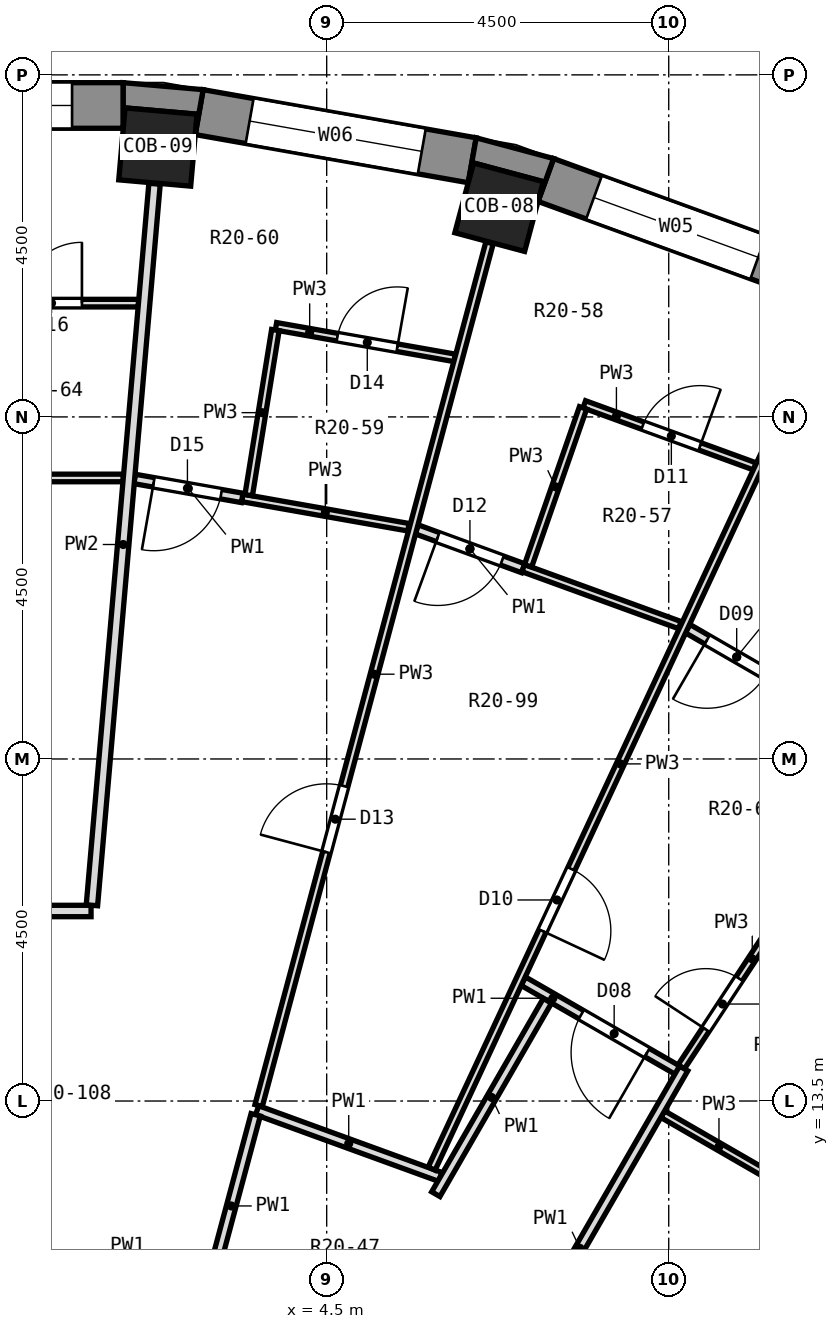
"""IFC4 building model, lengths in metres.
Left out: names, types, materials, properties, quantities, classifications, styles, units other than length and angle.
Written with IfcOpenShell. Run it as: python <this file> out.ifc"""

import sys

from ifc_helpers import new_model, si_unit, direction, frame, frame_2d, origin, origin_2d, place, context, subcontext, project, spatial, polyline, rectangle, outline, extrude, element, fill, save


model = new_model("IFC4")
c1 = context("Model", 3, precision=1e-05, world=origin(), true_north=direction((0.0, 1.0)))
c2 = subcontext(c1, "Body", "Model", "MODEL_VIEW")
j1 = project(units=[si_unit("LENGTHUNIT", "METRE"), si_unit("PLANEANGLEUNIT", "RADIAN")], contexts=[c1])
p1 = place(None, origin())
s1 = spatial("IfcSite", under=j1, at=p1, CompositionType="ELEMENT")
p2 = place(p1, origin())
s2 = spatial("IfcBuilding", under=s1, at=p2, CompositionType="ELEMENT")
p3 = place(p2, frame((0.0, 0.0, 121.6)))
s3 = spatial("IfcBuildingStorey", under=s2, at=p3, CompositionType="ELEMENT", Elevation=121.6)
for number, where, z_axis, x_axis in (
    (1, (6.768, 25.259, 0.0), (0.0, 0.0, 1.0), (0.259, 0.966, 0.0)),
    (2, (2.279, 26.051, 0.0), (0.0, 0.0, 1.0), (0.087, 0.996, 0.0)),
):
    element("IfcColumn", number, at=place(p3, frame(where, z_axis=z_axis, x_axis=x_axis)), inside=s3, PredefinedType="COLUMN", context=c2, shape_type="SweptSolid", body=[
        extrude(rectangle(XDim=0.95, YDim=0.95, at=origin_2d()), origin(), (0.0, 0.0, 1.0), 3.3),
    ])
p4 = place(p3, frame((10.811, 24.369, 0.0), z_axis=(0.0, 0.0, 1.0), x_axis=(-0.939703505393, 0.341990236633, 0.0)))
e3 = element("IfcWall", 3, at=p4, inside=s3, PredefinedType="SOLIDWALL", context=c2, shape_type="SweptSolid", body=[
    extrude(rectangle(XDim=3.648, YDim=0.6, at=frame_2d((1.824, 0.0))), origin(), (0.0, 0.0, 1.0), 2.8),
])
p5 = place(p4, frame((0.674, 0.0, 0.9)))
e4 = element("IfcOpeningElement", 4, at=p5, cuts=e3, PredefinedType="OPENING", context=c2, shape_type="SweptSolid", body=[
    extrude(rectangle(XDim=2.3, YDim=1.8, at=frame_2d((1.15, 0.9))), frame((0.0, 0.312, 0.0), z_axis=(0.0, -1.0, 0.0), x_axis=(1.0, 0.0, 0.0)), (0.0, 0.0, 1.0), 0.624),
])
p6 = place(p3, frame((6.415, 25.876, 0.0), z_axis=(0.0, 0.0, 1.0), x_axis=(-0.984803764455, 0.173670796382, 0.0)))
e5 = element("IfcWall", 5, at=p6, inside=s3, PredefinedType="SOLIDWALL", context=c2, shape_type="SweptSolid", body=[
    extrude(rectangle(XDim=3.648, YDim=0.6, at=frame_2d((1.824, 0.0))), origin(), (0.0, 0.0, 1.0), 2.8),
])
p7 = place(p6, frame((0.674, 0.0, 0.9)))
e6 = element("IfcOpeningElement", 6, at=p7, cuts=e5, PredefinedType="OPENING", context=c2, shape_type="SweptSolid", body=[
    extrude(rectangle(XDim=2.3, YDim=1.8, at=frame_2d((1.15, 0.9))), frame((0.0, 0.312, 0.0), z_axis=(0.0, -1.0, 0.0), x_axis=(1.0, 0.0, 0.0)), (0.0, 0.0, 1.0), 0.624),
])
p8 = place(p3, frame((1.824, 26.597, 0.0), z_axis=(0.0, 0.0, 1.0), x_axis=(-1.0, 0.0, 0.0)))
e7 = element("IfcWall", 7, at=p8, inside=s3, PredefinedType="SOLIDWALL", context=c2, shape_type="SweptSolid", body=[
    extrude(rectangle(XDim=3.648, YDim=0.6, at=frame_2d((1.824, 0.0))), origin(), (0.0, 0.0, 1.0), 2.8),
])
p9 = place(p8, frame((0.674, 0.0, 0.9)))
e8 = element("IfcOpeningElement", 8, at=p9, cuts=e7, PredefinedType="OPENING", context=c2, shape_type="SweptSolid", body=[
    extrude(rectangle(XDim=2.3, YDim=1.8, at=frame_2d((1.15, 0.9))), frame((0.0, 0.312, 0.0), z_axis=(0.0, -1.0, 0.0), x_axis=(1.0, 0.0, 0.0)), (0.0, 0.0, 1.0), 0.624),
])
p10 = place(p3, origin())
e9 = element("IfcWall", 9, at=p10, inside=s3, PredefinedType="SOLIDWALL", context=c2, shape_type="SweptSolid", body=[
    extrude(outline(polyline([(7.486, 25.899), (6.467, 26.172), (6.363, 25.581), (6.432, 25.841), (7.35, 25.595), (7.28, 25.335), (7.486, 25.899)])), origin(), (0.0, 0.0, 1.0), 2.8),
])
p11 = place(p3, origin())
e10 = element("IfcWall", 10, at=p11, inside=s3, PredefinedType="SOLIDWALL", context=c2, shape_type="SweptSolid", body=[
    extrude(outline(polyline([(2.875, 26.805), (1.824, 26.897), (1.824, 26.297), (1.847, 26.565), (2.794, 26.482), (2.77, 26.215), (2.875, 26.805)])), origin(), (0.0, 0.0, 1.0), 2.8),
])
p12 = place(p3, frame((8.921, 13.327, 0.0), z_axis=(0.0, 0.0, 1.0), x_axis=(0.866168931404, -0.499751320429, 0.0)))
e11 = element("IfcWall", 11, at=p12, inside=s3, PredefinedType="PARTITIONING", context=c2, shape_type="SweptSolid", body=[
    extrude(rectangle(XDim=1.708, YDim=0.1, at=frame_2d((0.854, 0.0))), origin(), (0.0, 0.0, 1.0), 2.8),
])
p13 = place(p3, frame((7.086, 15.077, 0.0), z_axis=(0.0, 0.0, 1.0), x_axis=(0.866192474201, -0.499710513836, 0.0)))
e12 = element("IfcWall", 12, at=p13, inside=s3, PredefinedType="PARTITIONING", context=c2, shape_type="SweptSolid", body=[
    extrude(rectangle(XDim=2.36, YDim=0.125, at=frame_2d((1.18, 0.0))), origin(), (0.0, 0.0, 1.0), 2.8),
])
p14 = place(p13, frame((0.881, 0.0, 0.0)))
e13 = element("IfcOpeningElement", 13, at=p14, cuts=e12, PredefinedType="OPENING", context=c2, shape_type="SweptSolid", body=[
    extrude(rectangle(XDim=1.0, YDim=2.1, at=frame_2d((0.5, 1.05))), frame((0.0, 0.074, 0.0), z_axis=(0.0, -1.0, 0.0), x_axis=(1.0, 0.0, 0.0)), (0.0, 0.0, 1.0), 0.149),
])
p15 = place(p3, frame((9.248, 19.715, 0.0), z_axis=(0.0, 0.0, 1.0), x_axis=(0.865896584481, -0.500223055231, 0.0)))
e14 = element("IfcWall", 14, at=p15, inside=s3, PredefinedType="PARTITIONING", context=c2, shape_type="SweptSolid", body=[
    extrude(rectangle(XDim=1.491, YDim=0.125, at=frame_2d((0.746, 0.0))), origin(), (0.0, 0.0, 1.0), 2.8),
])
p16 = place(p15, frame((0.296, 0.0, 0.0)))
e15 = element("IfcOpeningElement", 15, at=p16, cuts=e14, PredefinedType="OPENING", context=c2, shape_type="SweptSolid", body=[
    extrude(rectangle(XDim=0.9, YDim=2.1, at=frame_2d((0.45, 1.05))), frame((0.0, 0.074, 0.0), z_axis=(0.0, -1.0, 0.0), x_axis=(1.0, 0.0, 0.0)), (0.0, 0.0, 1.0), 0.149),
])
p17 = place(p3, frame((5.684, 21.021, 0.0), z_axis=(0.0, 0.0, 1.0), x_axis=(0.939314629693, -0.343056885143, 0.0)))
e16 = element("IfcWall", 16, at=p17, inside=s3, PredefinedType="PARTITIONING", context=c2, shape_type="SweptSolid", body=[
    extrude(rectangle(XDim=1.492, YDim=0.125, at=frame_2d((0.746, 0.0))), origin(), (0.0, 0.0, 1.0), 2.8),
])
p18 = place(p17, frame((0.296, 0.0, 0.0)))
e17 = element("IfcOpeningElement", 17, at=p18, cuts=e16, PredefinedType="OPENING", context=c2, shape_type="SweptSolid", body=[
    extrude(rectangle(XDim=0.9, YDim=2.1, at=frame_2d((0.45, 1.05))), frame((0.0, 0.074, 0.0), z_axis=(0.0, -1.0, 0.0), x_axis=(1.0, 0.0, 0.0)), (0.0, 0.0, 1.0), 0.149),
])
p19 = place(p3, frame((3.585, 13.379, 0.0), z_axis=(0.0, 0.0, 1.0), x_axis=(0.939651552045, -0.342132957691, 0.0)))
e18 = element("IfcWall", 18, at=p19, inside=s3, PredefinedType="PARTITIONING", context=c2, shape_type="SweptSolid", body=[
    extrude(rectangle(XDim=2.564, YDim=0.125, at=frame_2d((1.282, 0.0))), origin(), (0.0, 0.0, 1.0), 2.8),
])
p20 = place(p3, frame((7.086, 20.51, 0.0), z_axis=(0.0, 0.0, 1.0), x_axis=(0.939734879809, -0.341904015289, 0.0)))
e19 = element("IfcWall", 19, at=p20, inside=s3, PredefinedType="PARTITIONING", context=c2, shape_type="SweptSolid", body=[
    extrude(rectangle(XDim=2.192, YDim=0.1, at=frame_2d((1.096, 0.0))), origin(), (0.0, 0.0, 1.0), 2.8),
])
p21 = place(p3, frame((7.889, 22.666, 0.0), z_axis=(0.0, 0.0, 1.0), x_axis=(0.939679950861, -0.342054951652, 0.0)))
e20 = element("IfcWall", 20, at=p21, inside=s3, PredefinedType="PARTITIONING", context=c2, shape_type="SweptSolid", body=[
    extrude(rectangle(XDim=2.388, YDim=0.1, at=frame_2d((1.194, 0.0))), origin(), (0.0, 0.0, 1.0), 2.8),
])
p22 = place(p21, frame((0.819, 0.0, 0.0)))
e21 = element("IfcOpeningElement", 21, at=p22, cuts=e20, PredefinedType="OPENING", context=c2, shape_type="SweptSolid", body=[
    extrude(rectangle(XDim=0.8, YDim=2.1, at=frame_2d((0.4, 1.05))), frame((0.0, 0.062, 0.0), z_axis=(0.0, -1.0, 0.0), x_axis=(1.0, 0.0, 0.0)), (0.0, 0.0, 1.0), 0.124),
])
p23 = place(p3, frame((3.389, 21.435, 0.0), z_axis=(0.0, 0.0, 1.0), x_axis=(0.984795731746, -0.173716339864, 0.0)))
e22 = element("IfcWall", 22, at=p23, inside=s3, PredefinedType="PARTITIONING", context=c2, shape_type="SweptSolid", body=[
    extrude(rectangle(XDim=2.22, YDim=0.1, at=frame_2d((1.11, 0.0))), origin(), (0.0, 0.0, 1.0), 2.8),
])
p24 = place(p3, frame((1.972, 21.684, 0.0), z_axis=(0.0, 0.0, 1.0), x_axis=(0.984843298649, -0.173446467555, 0.0)))
e23 = element("IfcWall", 23, at=p24, inside=s3, PredefinedType="PARTITIONING", context=c2, shape_type="SweptSolid", body=[
    extrude(rectangle(XDim=1.438, YDim=0.125, at=frame_2d((0.719, 0.0))), origin(), (0.0, 0.0, 1.0), 2.8),
])
p25 = place(p24, frame((0.257, 0.0, 0.0)))
e24 = element("IfcOpeningElement", 24, at=p25, cuts=e23, PredefinedType="OPENING", context=c2, shape_type="SweptSolid", body=[
    extrude(rectangle(XDim=0.9, YDim=2.1, at=frame_2d((0.45, 1.05))), frame((0.0, 0.074, 0.0), z_axis=(0.0, -1.0, 0.0), x_axis=(1.0, 0.0, 0.0)), (0.0, 0.0, 1.0), 0.149),
])
p26 = place(p3, frame((3.833, 23.692, 0.0), z_axis=(0.0, 0.0, 1.0), x_axis=(0.984788703161, -0.173756180111, 0.0)))
e25 = element("IfcWall", 25, at=p26, inside=s3, PredefinedType="PARTITIONING", context=c2, shape_type="SweptSolid", body=[
    extrude(rectangle(XDim=2.389, YDim=0.1, at=frame_2d((1.194, 0.0))), origin(), (0.0, 0.0, 1.0), 2.8),
])
p27 = place(p26, frame((0.82, 0.0, 0.0)))
e26 = element("IfcOpeningElement", 26, at=p27, cuts=e25, PredefinedType="OPENING", context=c2, shape_type="SweptSolid", body=[
    extrude(rectangle(XDim=0.8, YDim=2.1, at=frame_2d((0.4, 1.05))), frame((0.0, 0.062, 0.0), z_axis=(0.0, -1.0, 0.0), x_axis=(1.0, 0.0, 0.0)), (0.0, 0.0, 1.0), 0.124),
])
p28 = place(p3, frame((-1.743, 16.0, 0.0), z_axis=(0.0, 0.0, 1.0), x_axis=(1.0, 0.0, 0.0)))
e27 = element("IfcWall", 27, at=p28, inside=s3, PredefinedType="PARTITIONING", context=c2, shape_type="SweptSolid", body=[
    extrude(rectangle(XDim=3.143, YDim=0.15, at=frame_2d((1.572, 0.0))), origin(), (0.0, 0.0, 1.0), 2.8),
])
p29 = place(p3, frame((-0.257, 21.697, 0.0), z_axis=(0.0, 0.0, 1.0), x_axis=(1.0, 0.0, 0.0)))
e28 = element("IfcWall", 28, at=p29, inside=s3, PredefinedType="PARTITIONING", context=c2, shape_type="SweptSolid", body=[
    extrude(rectangle(XDim=2.08, YDim=0.1, at=frame_2d((1.04, 0.0))), origin(), (0.0, 0.0, 1.0), 2.8),
])
p30 = place(p3, frame((-0.289, 23.997, 0.0), z_axis=(0.0, 0.0, 1.0), x_axis=(1.0, 0.0, 0.0)))
e29 = element("IfcWall", 29, at=p30, inside=s3, PredefinedType="PARTITIONING", context=c2, shape_type="SweptSolid", body=[
    extrude(rectangle(XDim=2.313, YDim=0.1, at=frame_2d((1.156, 0.0))), origin(), (0.0, 0.0, 1.0), 2.8),
])
p31 = place(p30, frame((0.769, 0.0, 0.0)))
e30 = element("IfcOpeningElement", 30, at=p31, cuts=e29, PredefinedType="OPENING", context=c2, shape_type="SweptSolid", body=[
    extrude(rectangle(XDim=0.8, YDim=2.1, at=frame_2d((0.4, 1.05))), frame((0.0, 0.062, 0.0), z_axis=(0.0, -1.0, 0.0), x_axis=(1.0, 0.0, 0.0)), (0.0, 0.0, 1.0), 0.124),
])
p32 = place(p3, frame((9.697, 9.695, 0.0), z_axis=(0.0, 0.0, 1.0), x_axis=(0.707106781187, 0.707106781187, 0.0)))
e31 = element("IfcWall", 31, at=p32, inside=s3, PredefinedType="PARTITIONING", context=c2, shape_type="SweptSolid", body=[
    extrude(rectangle(XDim=4.784, YDim=0.125, at=frame_2d((2.392, 0.0))), origin(), (0.0, 0.0, 1.0), 2.8),
])
p33 = place(p3, frame((9.165, 13.95, 0.0), z_axis=(0.0, 0.0, 1.0), x_axis=(0.549454342873, 0.835523742989, 0.0)))
e32 = element("IfcWall", 32, at=p33, inside=s3, PredefinedType="PARTITIONING", context=c2, shape_type="SweptSolid", body=[
    extrude(rectangle(XDim=1.991, YDim=0.1, at=frame_2d((0.996, 0.0))), origin(), (0.0, 0.0, 1.0), 2.8),
])
p34 = place(p33, frame((0.589, 0.0, 0.0)))
e33 = element("IfcOpeningElement", 33, at=p34, cuts=e32, PredefinedType="OPENING", context=c2, shape_type="SweptSolid", body=[
    extrude(rectangle(XDim=0.8, YDim=2.1, at=frame_2d((0.4, 1.05))), frame((0.0, 0.062, 0.0), z_axis=(0.0, -1.0, 0.0), x_axis=(1.0, 0.0, 0.0)), (0.0, 0.0, 1.0), 0.124),
])
p35 = place(p3, frame((6.467, 9.197, 0.0), z_axis=(0.0, 0.0, 1.0), x_axis=(0.499744377638, 0.866172937132, 0.0)))
e34 = element("IfcWall", 34, at=p35, inside=s3, PredefinedType="PARTITIONING", context=c2, shape_type="SweptSolid", body=[
    extrude(rectangle(XDim=5.463, YDim=0.125, at=frame_2d((2.731, 0.0))), origin(), (0.0, 0.0, 1.0), 2.8),
])
p36 = place(p3, frame((5.936, 12.275, 0.0), z_axis=(0.0, 0.0, 1.0), x_axis=(0.499715257766, 0.866189737388, 0.0)))
e35 = element("IfcWall", 35, at=p36, inside=s3, PredefinedType="PARTITIONING", context=c2, shape_type="SweptSolid", body=[
    extrude(rectangle(XDim=2.937, YDim=0.125, at=frame_2d((1.469, 0.0))), origin(), (0.0, 0.0, 1.0), 2.8),
])
p37 = place(p3, frame((5.881, 12.611, 0.0), z_axis=(0.0, 0.0, 1.0), x_axis=(0.422604500324, 0.906314203964, 0.0)))
e36 = element("IfcWall", 36, at=p37, inside=s3, PredefinedType="PARTITIONING", context=c2, shape_type="SweptSolid", body=[
    extrude(rectangle(XDim=11.75, YDim=0.1, at=frame_2d((5.875, 0.0))), origin(), (0.0, 0.0, 1.0), 2.8),
])
p38 = place(p37, frame((3.45, 0.0, 0.0)))
e37 = element("IfcOpeningElement", 37, at=p38, cuts=e36, PredefinedType="OPENING", context=c2, shape_type="SweptSolid", body=[
    extrude(rectangle(XDim=0.9, YDim=2.1, at=frame_2d((0.45, 1.05))), frame((0.0, 0.062, 0.0), z_axis=(0.0, -1.0, 0.0), x_axis=(1.0, 0.0, 0.0)), (0.0, 0.0, 1.0), 0.124),
])
p39 = place(p3, frame((7.149, 20.541, 0.0), z_axis=(0.0, 0.0, 1.0), x_axis=(0.328718620018, 0.944427905588, 0.0)))
e38 = element("IfcWall", 38, at=p39, inside=s3, PredefinedType="PARTITIONING", context=c2, shape_type="SweptSolid", body=[
    extrude(rectangle(XDim=2.2, YDim=0.1, at=frame_2d((1.1, 0.0))), origin(), (0.0, 0.0, 1.0), 2.8),
])
p40 = place(p3, frame((3.605, 13.44, 0.0), z_axis=(0.0, 0.0, 1.0), x_axis=(0.258538057112, 0.966001072994, 0.0)))
e39 = element("IfcWall", 39, at=p40, inside=s3, PredefinedType="PARTITIONING", context=c2, shape_type="SweptSolid", body=[
    extrude(rectangle(XDim=11.75, YDim=0.1, at=frame_2d((5.875, 0.0))), origin(), (0.0, 0.0, 1.0), 2.8),
])
p41 = place(p40, frame((3.45, 0.0, 0.0)))
e40 = element("IfcOpeningElement", 40, at=p41, cuts=e39, PredefinedType="OPENING", context=c2, shape_type="SweptSolid", body=[
    extrude(rectangle(XDim=0.9, YDim=2.1, at=frame_2d((0.45, 1.05))), frame((0.0, 0.062, 0.0), z_axis=(0.0, -1.0, 0.0), x_axis=(1.0, 0.0, 0.0)), (0.0, 0.0, 1.0), 0.124),
])
p42 = place(p3, frame((2.923, 10.921, 0.0), z_axis=(0.0, 0.0, 1.0), x_axis=(0.258837674225, 0.965920834438, 0.0)))
e41 = element("IfcWall", 41, at=p42, inside=s3, PredefinedType="PARTITIONING", context=c2, shape_type="SweptSolid", body=[
    extrude(rectangle(XDim=2.483, YDim=0.125, at=frame_2d((1.241, 0.0))), origin(), (0.0, 0.0, 1.0), 2.8),
])
p43 = place(p3, frame((3.474, 21.47, 0.0), z_axis=(0.0, 0.0, 1.0), x_axis=(0.159556862709, 0.987188739585, 0.0)))
e42 = element("IfcWall", 42, at=p43, inside=s3, PredefinedType="PARTITIONING", context=c2, shape_type="SweptSolid", body=[
    extrude(rectangle(XDim=2.2, YDim=0.1, at=frame_2d((1.1, 0.0))), origin(), (0.0, 0.0, 1.0), 2.8),
])
p44 = place(p3, frame((1.411, 16.075, 0.0), z_axis=(0.0, 0.0, 1.0), x_axis=(0.086480343505, 0.996253557177, 0.0)))
e43 = element("IfcWall", 43, at=p44, inside=s3, PredefinedType="PARTITIONING", context=c2, shape_type="SweptSolid", body=[
    extrude(rectangle(XDim=9.528, YDim=0.15, at=frame_2d((4.764, 0.0))), origin(), (0.0, 0.0, 1.0), 2.8),
])
p45 = place(p5, origin())
e44 = element("IfcWindow", 44, at=p45, inside=s3, PartitioningType="SINGLE_PANEL", PredefinedType="WINDOW", context=c2, shape_type="SweptSolid", body=[
    extrude(rectangle(XDim=2.3, YDim=1.8, at=frame_2d((1.15, 0.9))), frame((0.0, 0.18, 0.0), z_axis=(0.0, -1.0, 0.0), x_axis=(1.0, 0.0, 0.0)), (0.0, 0.0, 1.0), 0.06),
])
fill(e4, e44)
p46 = place(p7, origin())
e45 = element("IfcWindow", 45, at=p46, inside=s3, PartitioningType="SINGLE_PANEL", PredefinedType="WINDOW", context=c2, shape_type="SweptSolid", body=[
    extrude(rectangle(XDim=2.3, YDim=1.8, at=frame_2d((1.15, 0.9))), frame((0.0, 0.18, 0.0), z_axis=(0.0, -1.0, 0.0), x_axis=(1.0, 0.0, 0.0)), (0.0, 0.0, 1.0), 0.06),
])
fill(e6, e45)
p47 = place(p9, origin())
e46 = element("IfcWindow", 46, at=p47, inside=s3, PartitioningType="SINGLE_PANEL", PredefinedType="WINDOW", context=c2, shape_type="SweptSolid", body=[
    extrude(rectangle(XDim=2.3, YDim=1.8, at=frame_2d((1.15, 0.9))), frame((0.0, 0.18, 0.0), z_axis=(0.0, -1.0, 0.0), x_axis=(1.0, 0.0, 0.0)), (0.0, 0.0, 1.0), 0.06),
])
fill(e8, e46)
p48 = place(p34, origin())
e47 = element("IfcDoor", 47, at=p48, inside=s3, OperationType="SINGLE_SWING_LEFT", PredefinedType="DOOR", context=c2, shape_type="SweptSolid", body=[
    extrude(rectangle(XDim=0.8, YDim=2.1, at=frame_2d((0.4, 1.05))), frame((0.0, 0.025, 0.0), z_axis=(0.0, -1.0, 0.0), x_axis=(1.0, 0.0, 0.0)), (0.0, 0.0, 1.0), 0.05),
])
fill(e33, e47)
p49 = place(p14, frame((1.0, 0.0, 0.0), z_axis=(0.0, 0.0, 1.0), x_axis=(-1.0, 0.0, 0.0)))
e48 = element("IfcDoor", 48, at=p49, inside=s3, OperationType="SINGLE_SWING_LEFT", PredefinedType="DOOR", context=c2, shape_type="SweptSolid", body=[
    extrude(rectangle(XDim=1.0, YDim=2.1, at=frame_2d((0.5, 1.05))), frame((0.0, 0.025, 0.0), z_axis=(0.0, -1.0, 0.0), x_axis=(1.0, 0.0, 0.0)), (0.0, 0.0, 1.0), 0.05),
])
fill(e13, e48)
p50 = place(p16, frame((0.9, 0.0, 0.0), z_axis=(0.0, 0.0, 1.0), x_axis=(-1.0, 0.0, 0.0)))
e49 = element("IfcDoor", 49, at=p50, inside=s3, OperationType="SINGLE_SWING_RIGHT", PredefinedType="DOOR", context=c2, shape_type="SweptSolid", body=[
    extrude(rectangle(XDim=0.9, YDim=2.1, at=frame_2d((0.45, 1.05))), frame((0.0, 0.025, 0.0), z_axis=(0.0, -1.0, 0.0), x_axis=(1.0, 0.0, 0.0)), (0.0, 0.0, 1.0), 0.05),
])
fill(e15, e49)
p51 = place(p38, frame((0.9, 0.0, 0.0), z_axis=(0.0, 0.0, 1.0), x_axis=(-1.0, 0.0, 0.0)))
e50 = element("IfcDoor", 50, at=p51, inside=s3, OperationType="SINGLE_SWING_RIGHT", PredefinedType="DOOR", context=c2, shape_type="SweptSolid", body=[
    extrude(rectangle(XDim=0.9, YDim=2.1, at=frame_2d((0.45, 1.05))), frame((0.0, 0.025, 0.0), z_axis=(0.0, -1.0, 0.0), x_axis=(1.0, 0.0, 0.0)), (0.0, 0.0, 1.0), 0.05),
])
fill(e37, e50)
p52 = place(p22, origin())
e51 = element("IfcDoor", 51, at=p52, inside=s3, OperationType="SINGLE_SWING_RIGHT", PredefinedType="DOOR", context=c2, shape_type="SweptSolid", body=[
    extrude(rectangle(XDim=0.8, YDim=2.1, at=frame_2d((0.4, 1.05))), frame((0.0, 0.025, 0.0), z_axis=(0.0, -1.0, 0.0), x_axis=(1.0, 0.0, 0.0)), (0.0, 0.0, 1.0), 0.05),
])
fill(e21, e51)
p53 = place(p18, frame((0.9, 0.0, 0.0), z_axis=(0.0, 0.0, 1.0), x_axis=(-1.0, 0.0, 0.0)))
e52 = element("IfcDoor", 52, at=p53, inside=s3, OperationType="SINGLE_SWING_RIGHT", PredefinedType="DOOR", context=c2, shape_type="SweptSolid", body=[
    extrude(rectangle(XDim=0.9, YDim=2.1, at=frame_2d((0.45, 1.05))), frame((0.0, 0.025, 0.0), z_axis=(0.0, -1.0, 0.0), x_axis=(1.0, 0.0, 0.0)), (0.0, 0.0, 1.0), 0.05),
])
fill(e17, e52)
p54 = place(p41, origin())
e53 = element("IfcDoor", 53, at=p54, inside=s3, OperationType="SINGLE_SWING_LEFT", PredefinedType="DOOR", context=c2, shape_type="SweptSolid", body=[
    extrude(rectangle(XDim=0.9, YDim=2.1, at=frame_2d((0.45, 1.05))), frame((0.0, 0.025, 0.0), z_axis=(0.0, -1.0, 0.0), x_axis=(1.0, 0.0, 0.0)), (0.0, 0.0, 1.0), 0.05),
])
fill(e40, e53)
p55 = place(p27, origin())
e54 = element("IfcDoor", 54, at=p55, inside=s3, OperationType="SINGLE_SWING_RIGHT", PredefinedType="DOOR", context=c2, shape_type="SweptSolid", body=[
    extrude(rectangle(XDim=0.8, YDim=2.1, at=frame_2d((0.4, 1.05))), frame((0.0, 0.025, 0.0), z_axis=(0.0, -1.0, 0.0), x_axis=(1.0, 0.0, 0.0)), (0.0, 0.0, 1.0), 0.05),
])
fill(e26, e54)
p56 = place(p25, frame((0.9, 0.0, 0.0), z_axis=(0.0, 0.0, 1.0), x_axis=(-1.0, 0.0, 0.0)))
e55 = element("IfcDoor", 55, at=p56, inside=s3, OperationType="SINGLE_SWING_RIGHT", PredefinedType="DOOR", context=c2, shape_type="SweptSolid", body=[
    extrude(rectangle(XDim=0.9, YDim=2.1, at=frame_2d((0.45, 1.05))), frame((0.0, 0.025, 0.0), z_axis=(0.0, -1.0, 0.0), x_axis=(1.0, 0.0, 0.0)), (0.0, 0.0, 1.0), 0.05),
])
fill(e24, e55)
p57 = place(p31, origin())
e56 = element("IfcDoor", 56, at=p57, inside=s3, OperationType="SINGLE_SWING_RIGHT", PredefinedType="DOOR", context=c2, shape_type="SweptSolid", body=[
    extrude(rectangle(XDim=0.8, YDim=2.1, at=frame_2d((0.4, 1.05))), frame((0.0, 0.025, 0.0), z_axis=(0.0, -1.0, 0.0), x_axis=(1.0, 0.0, 0.0)), (0.0, 0.0, 1.0), 0.05),
])
fill(e30, e56)
save(model, sys.argv[1])
